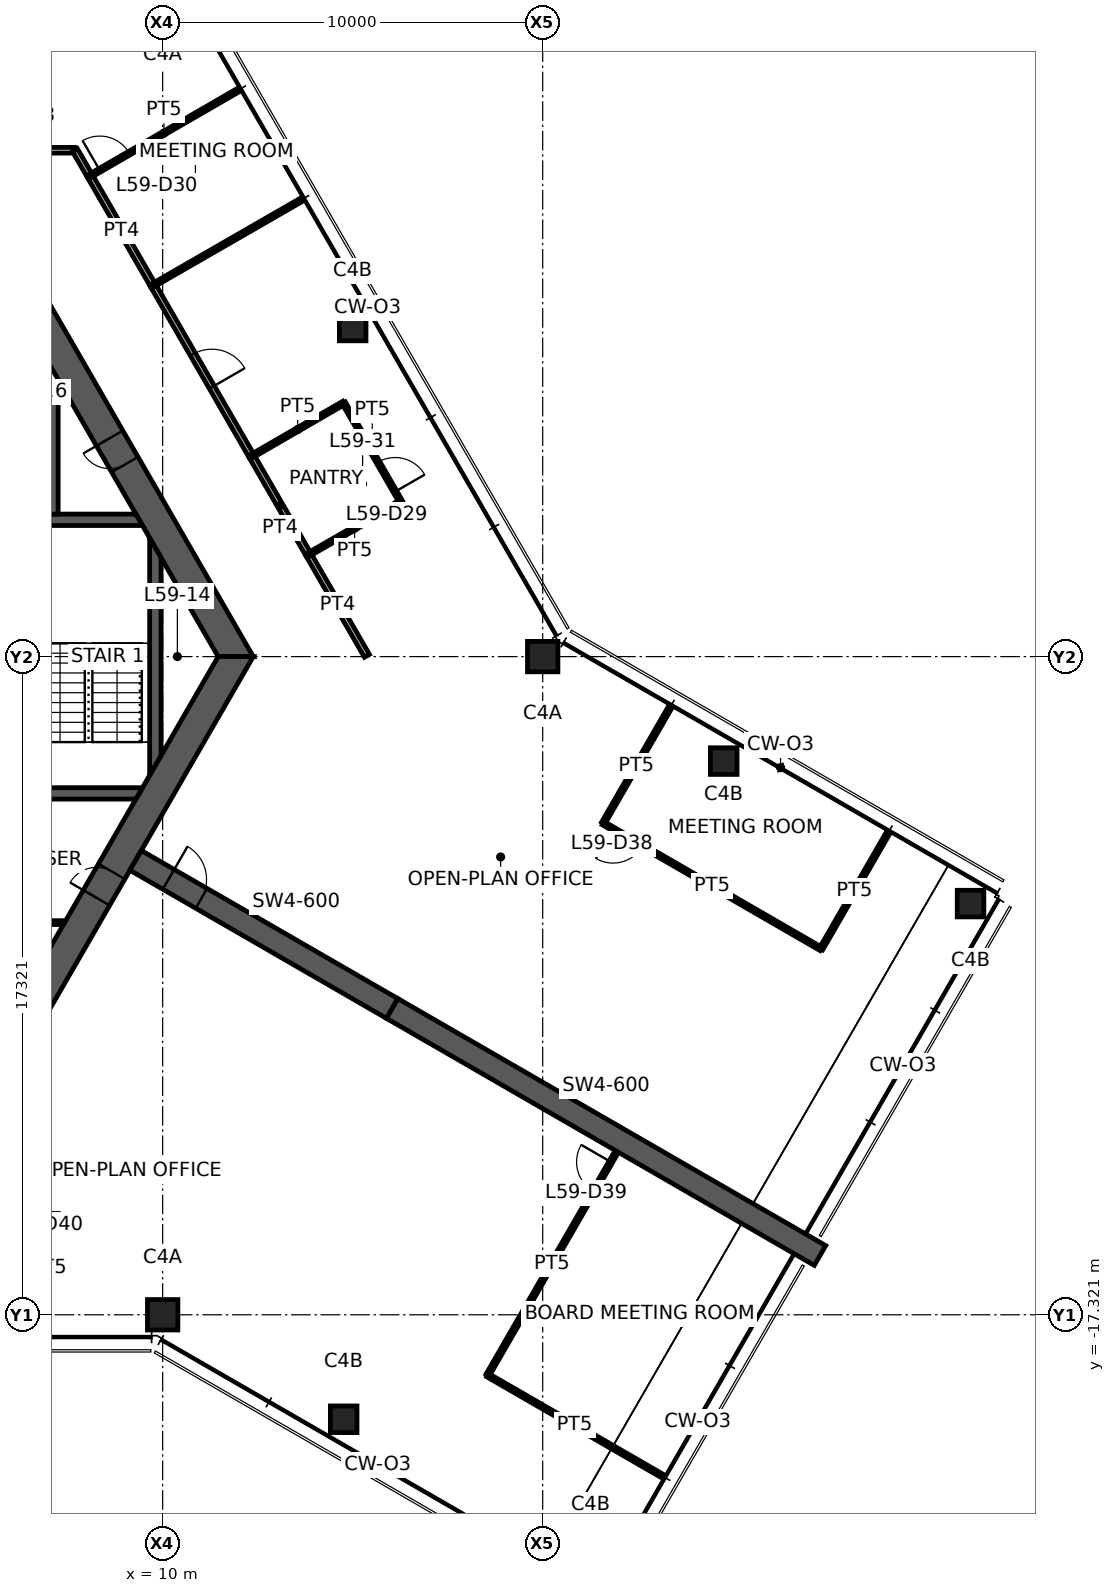
"""IFC4 building model, lengths in metres.
Left out: names, types, materials, properties, quantities, classifications, styles, units other than length and angle.
Written with IfcOpenShell. Run it as: python <this file> out.ifc"""

import sys

from ifc_helpers import new_model, si_unit, direction, frame, frame_2d, origin, origin_2d, place, context, subcontext, project, spatial, polyline, rectangle, hollow_rectangle, outline, extrude, element, fill, save


model = new_model("IFC4")
c1 = context("Model", 3, precision=1e-05, world=origin(), true_north=direction((0.0, 1.0)))
c2 = subcontext(c1, "Body", "Model", "MODEL_VIEW")
j1 = project(units=[si_unit("LENGTHUNIT", "METRE"), si_unit("PLANEANGLEUNIT", "RADIAN")], contexts=[c1])
p1 = place(None, origin())
s1 = spatial("IfcSite", under=j1, at=p1, CompositionType="ELEMENT")
p2 = place(p1, origin())
s2 = spatial("IfcBuilding", under=s1, at=p2, CompositionType="ELEMENT")
p3 = place(p2, frame((0.0, 0.0, 236.2)))
s3 = spatial("IfcBuildingStorey", under=s2, at=p3, CompositionType="ELEMENT", Elevation=236.2)
for number, where, z_axis, x_axis in (
    (1, (20.0, 0.0, 0.0), (0.0, 0.0, 1.0), (1.0, 0.0, 0.0)),
    (2, (10.0, -17.321, 0.0), (0.0, 0.0, 1.0), (1.0, 0.0, 0.0)),
):
    element("IfcColumn", number, at=place(p3, frame(where, z_axis=z_axis, x_axis=x_axis)), inside=s3, PredefinedType="COLUMN", context=c2, shape_type="SweptSolid", body=[
        extrude(hollow_rectangle(XDim=0.8, YDim=0.8, WallThickness=0.04, at=origin_2d()), origin(), (0.0, 0.0, 1.0), 3.9),
    ])
for number, where, z_axis, x_axis in (
    (3, (15.0, 8.66, 0.0), (0.0, 0.0, 1.0), (1.0, 0.0, 0.0)),
    (4, (14.763, -20.071, 0.0), (0.0, 0.0, 1.0), (1.0, 0.0, 0.0)),
    (5, (24.763, -2.75, 0.0), (0.0, 0.0, 1.0), (1.0, 0.0, 0.0)),
    (6, (31.258, -6.5, 0.0), (0.0, 0.0, 1.0), (1.0, 0.0, 0.0)),
):
    element("IfcColumn", number, at=place(p3, frame(where, z_axis=z_axis, x_axis=x_axis)), inside=s3, PredefinedType="COLUMN", context=c2, shape_type="SweptSolid", body=[
        extrude(hollow_rectangle(XDim=0.7, YDim=0.7, WallThickness=0.032, at=origin_2d()), origin(), (0.0, 0.0, 1.0), 3.9),
    ])
p4 = place(p3, frame((11.922, 0.0, 0.0), z_axis=(0.0, 0.0, 1.0), x_axis=(-0.500004296715, 0.866022923061, 0.0)))
e7 = element("IfcWall", 7, at=p4, inside=s3, PredefinedType="SHEAR", context=c2, shape_type="SweptSolid", body=[
    extrude(outline(polyline([(-0.231, -0.4), (5.835, -0.4), (6.635, -0.4), (12.153, -0.4), (11.691, 0.4), (6.635, 0.4), (5.835, 0.4), (0.231, 0.4), (-0.231, -0.4)])), origin(), (0.0, 0.0, 1.0), 3.9),
])
p5 = place(p4, frame((5.835, 0.0, 0.0)))
e8 = element("IfcOpeningElement", 8, at=p5, cuts=e7, PredefinedType="OPENING", context=c2, shape_type="SweptSolid", body=[
    extrude(rectangle(XDim=0.8, YDim=2.1, at=frame_2d((0.4, 1.05))), frame((0.0, 0.41, 0.0), z_axis=(0.0, -1.0, 0.0), x_axis=(1.0, 0.0, 0.0)), (0.0, 0.0, 1.0), 0.82),
])
p6 = place(p3, frame((5.961, -10.325, 0.0), z_axis=(0.0, 0.0, 1.0), x_axis=(0.500004296715, 0.866022923061, 0.0)))
e9 = element("IfcWall", 9, at=p6, inside=s3, PredefinedType="SHEAR", context=c2, shape_type="SweptSolid", body=[
    extrude(outline(polyline([(-0.231, -0.4), (4.594, -0.4), (5.394, -0.4), (12.153, -0.4), (11.691, 0.4), (5.394, 0.4), (4.594, 0.4), (0.231, 0.4), (-0.231, -0.4)])), origin(), (0.0, 0.0, 1.0), 3.9),
])
p7 = place(p6, frame((4.594, 0.0, 0.0)))
e10 = element("IfcOpeningElement", 10, at=p7, cuts=e9, PredefinedType="OPENING", context=c2, shape_type="SweptSolid", body=[
    extrude(rectangle(XDim=0.8, YDim=2.1, at=frame_2d((0.4, 1.05))), frame((0.0, 0.41, 0.0), z_axis=(0.0, -1.0, 0.0), x_axis=(1.0, 0.0, 0.0)), (0.0, 0.0, 1.0), 0.82),
])
p8 = place(p3, frame((9.288, -5.363, 0.0), z_axis=(0.0, 0.0, 1.0), x_axis=(0.866031736626, -0.499989031036, 0.0)))
e11 = element("IfcWall", 11, at=p8, inside=s3, PredefinedType="SHEAR", context=c2, shape_type="SweptSolid", body=[
    extrude(rectangle(XDim=7.796, YDim=0.6, at=frame_2d((3.898, 0.0))), origin(), (0.0, 0.0, 1.0), 3.9),
])
p9 = place(p8, frame((1.0, 0.0, 0.0)))
e12 = element("IfcOpeningElement", 12, at=p9, cuts=e11, PredefinedType="OPENING", context=c2, shape_type="SweptSolid", body=[
    extrude(rectangle(XDim=1.0, YDim=2.1, at=frame_2d((0.5, 1.05))), frame((0.0, 0.31, 0.0), z_axis=(0.0, -1.0, 0.0), x_axis=(1.0, 0.0, 0.0)), (0.0, 0.0, 1.0), 0.62),
])
p10 = place(p3, frame((16.039, -9.26, 0.0), z_axis=(0.0, 0.0, 1.0), x_axis=(0.866024837091, -0.50000098154, 0.0)))
e13 = element("IfcWall", 13, at=p10, inside=s3, PredefinedType="SHEAR", context=c2, shape_type="SweptSolid", body=[
    extrude(rectangle(XDim=13.0, YDim=0.6, at=frame_2d((6.5, 0.0))), origin(), (0.0, 0.0, 1.0), 3.9),
])
p11 = place(p3, frame((1.45, 3.6, 0.0), z_axis=(0.0, 0.0, 1.0), x_axis=(1.0, 0.0, 0.0)))
e14 = element("IfcWall", 14, at=p11, inside=s3, PredefinedType="SHEAR", context=c2, shape_type="SweptSolid", body=[
    extrude(outline(polyline([(0.0, -0.15), (1.15, -0.15), (2.05, -0.15), (3.4, -0.15), (4.7, -0.15), (8.019, -0.15), (7.845, 0.15), (4.7, 0.15), (3.4, 0.15), (2.05, 0.15), (1.15, 0.15), (0.0, 0.15), (0.0, -0.15)])), origin(), (0.0, 0.0, 1.0), 3.9),
])
p12 = place(p11, frame((1.15, 0.0, 0.0)))
e15 = element("IfcOpeningElement", 15, at=p12, cuts=e14, PredefinedType="OPENING", context=c2, shape_type="SweptSolid", body=[
    extrude(rectangle(XDim=0.9, YDim=2.1, at=frame_2d((0.45, 1.05))), frame((0.0, 0.16, 0.0), z_axis=(0.0, -1.0, 0.0), x_axis=(1.0, 0.0, 0.0)), (0.0, 0.0, 1.0), 0.32),
])
p13 = place(p11, frame((3.4, 0.0, 0.0)))
e16 = element("IfcOpeningElement", 16, at=p13, cuts=e14, PredefinedType="OPENING", context=c2, shape_type="SweptSolid", body=[
    extrude(rectangle(XDim=1.3, YDim=2.1, at=frame_2d((0.65, 1.05))), frame((0.0, 0.16, 0.0), z_axis=(0.0, -1.0, 0.0), x_axis=(1.0, 0.0, 0.0)), (0.0, 0.0, 1.0), 0.32),
])
p14 = place(p3, frame((1.45, -3.6, 0.0), z_axis=(0.0, 0.0, 1.0), x_axis=(1.0, 0.0, 0.0)))
e17 = element("IfcWall", 17, at=p14, inside=s3, PredefinedType="SHEAR", context=c2, shape_type="SweptSolid", body=[
    extrude(outline(polyline([(0.0, -0.15), (1.05, -0.15), (2.15, -0.15), (7.845, -0.15), (8.019, 0.15), (2.15, 0.15), (1.05, 0.15), (0.0, 0.15), (0.0, -0.15)])), origin(), (0.0, 0.0, 1.0), 3.9),
])
p15 = place(p14, frame((1.05, 0.0, 0.0)))
e18 = element("IfcOpeningElement", 18, at=p15, cuts=e17, PredefinedType="OPENING", context=c2, shape_type="SweptSolid", body=[
    extrude(rectangle(XDim=1.1, YDim=2.1, at=frame_2d((0.55, 1.05))), frame((0.0, 0.16, 0.0), z_axis=(0.0, -1.0, 0.0), x_axis=(1.0, 0.0, 0.0)), (0.0, 0.0, 1.0), 0.32),
])
p16 = place(p3, frame((4.65, 7.0, 0.0), z_axis=(0.0, 0.0, 1.0), x_axis=(1.0, 0.0, 0.0)))
e19 = element("IfcWall", 19, at=p16, inside=s3, PredefinedType="SHEAR", context=c2, shape_type="SweptSolid", body=[
    extrude(rectangle(XDim=2.6, YDim=0.3, at=frame_2d((1.3, 0.0))), origin(), (0.0, 0.0, 1.0), 3.9),
])
p17 = place(p3, frame((7.1, 3.75, 0.0), z_axis=(0.0, 0.0, 1.0), x_axis=(0.0, 1.0, 0.0)))
e20 = element("IfcWall", 20, at=p17, inside=s3, PredefinedType="SHEAR", context=c2, shape_type="SweptSolid", body=[
    extrude(rectangle(XDim=3.1, YDim=0.3, at=frame_2d((1.55, 0.0))), origin(), (0.0, 0.0, 1.0), 3.9),
])
p18 = place(p3, frame((9.808, -2.862, 0.0), z_axis=(0.0, 0.0, 1.0), x_axis=(0.0, 1.0, 0.0)))
e21 = element("IfcWall", 21, at=p18, inside=s3, PredefinedType="SHEAR", context=c2, shape_type="SweptSolid", body=[
    extrude(outline(polyline([(0.26, -0.15), (5.465, -0.15), (5.984, 0.15), (-0.26, 0.15), (0.26, -0.15)])), origin(), (0.0, 0.0, 1.0), 3.9),
])
p19 = place(p3, frame((4.65, -7.0, 0.0), z_axis=(0.0, 0.0, 1.0), x_axis=(1.0, 0.0, 0.0)))
e22 = element("IfcWall", 22, at=p19, inside=s3, PredefinedType="PARTITIONING", context=c2, shape_type="SweptSolid", body=[
    extrude(outline(polyline([(0.0, -0.05), (0.35, -0.05), (1.15, -0.05), (2.74, -0.05), (2.769, 0.0), (2.775, 0.05), (1.15, 0.05), (0.35, 0.05), (0.0, 0.05), (0.0, -0.05)])), origin(), (0.0, 0.0, 1.0), 2.95),
])
p20 = place(p19, frame((0.35, 0.0, 0.0)))
e23 = element("IfcOpeningElement", 23, at=p20, cuts=e22, PredefinedType="OPENING", context=c2, shape_type="SweptSolid", body=[
    extrude(rectangle(XDim=0.8, YDim=2.1, at=frame_2d((0.4, 1.05))), frame((0.0, 0.06, 0.0), z_axis=(0.0, -1.0, 0.0), x_axis=(1.0, 0.0, 0.0)), (0.0, 0.0, 1.0), 0.12),
])
p21 = place(p3, frame((12.337, 5.281, 0.0), z_axis=(0.0, 0.0, 1.0), x_axis=(0.499977562641, -0.866038357612, 0.0)))
e24 = element("IfcWall", 24, at=p21, inside=s3, PredefinedType="PARTITIONING", context=c2, shape_type="SweptSolid", body=[
    extrude(rectangle(XDim=3.01, YDim=0.15, at=frame_2d((1.505, 0.0))), origin(), (0.0, 0.0, 1.0), 2.95),
])
p22 = place(p3, frame((8.08, 12.656, 0.0), z_axis=(0.0, 0.0, 1.0), x_axis=(0.499990242038, -0.866031037473, 0.0)))
e25 = element("IfcWall", 25, at=p22, inside=s3, PredefinedType="PARTITIONING", context=c2, shape_type="SweptSolid", body=[
    extrude(rectangle(XDim=3.341, YDim=0.15, at=frame_2d((1.67, 0.0))), origin(), (0.0, 0.0, 1.0), 2.95),
])
p23 = place(p3, frame((9.745, 9.771, 0.0), z_axis=(0.0, 0.0, 1.0), x_axis=(0.499981525251, -0.866036069923, 0.0)))
e26 = element("IfcWall", 26, at=p23, inside=s3, PredefinedType="PARTITIONING", context=c2, shape_type="SweptSolid", body=[
    extrude(rectangle(XDim=5.194, YDim=0.15, at=frame_2d((2.597, 0.0))), origin(), (0.0, 0.0, 1.0), 2.95),
])
p24 = place(p23, frame((2.097, 0.0, 0.0)))
e27 = element("IfcOpeningElement", 27, at=p24, cuts=e26, PredefinedType="OPENING", context=c2, shape_type="SweptSolid", body=[
    extrude(rectangle(XDim=1.0, YDim=2.1, at=frame_2d((0.5, 1.05))), frame((0.0, 0.085, 0.0), z_axis=(0.0, -1.0, 0.0), x_axis=(1.0, 0.0, 0.0)), (0.0, 0.0, 1.0), 0.17),
])
p25 = place(p3, frame((13.838, 2.683, 0.0), z_axis=(0.0, 0.0, 1.0), x_axis=(0.499965335005, -0.866045416704, 0.0)))
e28 = element("IfcWall", 28, at=p25, inside=s3, PredefinedType="PARTITIONING", context=c2, shape_type="SweptSolid", body=[
    extrude(rectangle(XDim=3.074, YDim=0.15, at=frame_2d((1.537, 0.0))), origin(), (0.0, 0.0, 1.0), 2.95),
])
p26 = place(p3, frame((4.46, 13.325, 0.0), z_axis=(0.0, 0.0, 1.0), x_axis=(1.0, 0.0, 0.0)))
e29 = element("IfcWall", 29, at=p26, inside=s3, PredefinedType="PARTITIONING", context=c2, shape_type="SweptSolid", body=[
    extrude(rectangle(XDim=3.233, YDim=0.15, at=frame_2d((1.616, 0.0))), origin(), (0.0, 0.0, 1.0), 2.95),
])
p27 = place(p26, frame((1.116, 0.0, 0.0)))
e30 = element("IfcOpeningElement", 30, at=p27, cuts=e29, PredefinedType="OPENING", context=c2, shape_type="SweptSolid", body=[
    extrude(rectangle(XDim=1.0, YDim=2.1, at=frame_2d((0.5, 1.05))), frame((0.0, 0.085, 0.0), z_axis=(0.0, -1.0, 0.0), x_axis=(1.0, 0.0, 0.0)), (0.0, 0.0, 1.0), 0.17),
])
p28 = place(p3, frame((7.693, 13.325, 0.0), z_axis=(0.0, 0.0, 1.0), x_axis=(0.50010075504, -0.86596722502, 0.0)))
e31 = element("IfcWall", 31, at=p28, inside=s3, PredefinedType="PARTITIONING", context=c2, shape_type="SweptSolid", body=[
    extrude(rectangle(XDim=0.782, YDim=0.15, at=frame_2d((0.391, 0.0))), origin(), (0.0, 0.0, 1.0), 2.95),
])
p29 = place(p3, frame((12.342, 5.273, 0.0), z_axis=(0.0, 0.0, 1.0), x_axis=(0.865195372903, 0.501434907746, 0.0)))
e32 = element("IfcWall", 32, at=p29, inside=s3, PredefinedType="PARTITIONING", context=c2, shape_type="SweptSolid", body=[
    extrude(rectangle(XDim=2.8, YDim=0.1, at=frame_2d((1.4, 0.0))), origin(), (0.0, 0.0, 1.0), 2.95),
])
p30 = place(p3, frame((14.765, 6.677, 0.0), z_axis=(0.0, 0.0, 1.0), x_axis=(0.499990139034, -0.866031096941, 0.0)))
e33 = element("IfcWall", 33, at=p30, inside=s3, PredefinedType="PARTITIONING", context=c2, shape_type="SweptSolid", body=[
    extrude(rectangle(XDim=3.0, YDim=0.1, at=frame_2d((1.5, 0.0))), origin(), (0.0, 0.0, 1.0), 2.95),
])
p31 = place(p30, frame((1.8, 0.0, 0.0)))
e34 = element("IfcOpeningElement", 34, at=p31, cuts=e33, PredefinedType="OPENING", context=c2, shape_type="SweptSolid", body=[
    extrude(rectangle(XDim=0.9, YDim=2.1, at=frame_2d((0.45, 1.05))), frame((0.0, 0.06, 0.0), z_axis=(0.0, -1.0, 0.0), x_axis=(1.0, 0.0, 0.0)), (0.0, 0.0, 1.0), 0.12),
])
p32 = place(p3, frame((16.265, 4.079, 0.0), z_axis=(0.0, 0.0, 1.0), x_axis=(-0.86679607088, -0.498662783358, 0.0)))
e35 = element("IfcWall", 35, at=p32, inside=s3, PredefinedType="PARTITIONING", context=c2, shape_type="SweptSolid", body=[
    extrude(rectangle(XDim=2.8, YDim=0.1, at=frame_2d((1.4, 0.0))), origin(), (0.0, 0.0, 1.0), 2.95),
])
p33 = place(p3, frame((13.623, 12.004, 0.0), z_axis=(0.0, 0.0, 1.0), x_axis=(-0.866535947524, -0.499114667835, 0.0)))
e36 = element("IfcWall", 36, at=p33, inside=s3, PredefinedType="PARTITIONING", context=c2, shape_type="SweptSolid", body=[
    extrude(rectangle(XDim=4.475, YDim=0.1, at=frame_2d((2.238, 0.0))), origin(), (0.0, 0.0, 1.0), 2.95),
])
p34 = place(p3, frame((8.084, 12.648, 0.0), z_axis=(0.0, 0.0, 1.0), x_axis=(0.865532616855, 0.500852562298, 0.0)))
e37 = element("IfcWall", 37, at=p34, inside=s3, PredefinedType="PARTITIONING", context=c2, shape_type="SweptSolid", body=[
    extrude(rectangle(XDim=4.506, YDim=0.1, at=frame_2d((2.253, 0.0))), origin(), (0.0, 0.0, 1.0), 2.95),
])
p35 = place(p34, frame((0.3, 0.0, 0.0)))
e38 = element("IfcOpeningElement", 38, at=p35, cuts=e37, PredefinedType="OPENING", context=c2, shape_type="SweptSolid", body=[
    extrude(rectangle(XDim=0.9, YDim=2.1, at=frame_2d((0.45, 1.05))), frame((0.0, 0.06, 0.0), z_axis=(0.0, -1.0, 0.0), x_axis=(1.0, 0.0, 0.0)), (0.0, 0.0, 1.0), 0.12),
])
p36 = place(p3, frame((21.592, -4.383, 0.0), z_axis=(0.0, 0.0, 1.0), x_axis=(0.500009906705, 0.86601968407, 0.0)))
e39 = element("IfcWall", 39, at=p36, inside=s3, PredefinedType="PARTITIONING", context=c2, shape_type="SweptSolid", body=[
    extrude(rectangle(XDim=3.48, YDim=0.1, at=frame_2d((1.74, 0.0))), origin(), (0.0, 0.0, 1.0), 2.95),
])
p37 = place(p3, frame((27.325, -7.693, 0.0), z_axis=(0.0, 0.0, 1.0), x_axis=(-0.866021597574, 0.500006592492, 0.0)))
e40 = element("IfcWall", 40, at=p37, inside=s3, PredefinedType="PARTITIONING", context=c2, shape_type="SweptSolid", body=[
    extrude(rectangle(XDim=6.62, YDim=0.1, at=frame_2d((3.31, 0.0))), origin(), (0.0, 0.0, 1.0), 2.95),
])
p38 = place(p37, frame((5.42, 0.0, 0.0)))
e41 = element("IfcOpeningElement", 41, at=p38, cuts=e40, PredefinedType="OPENING", context=c2, shape_type="SweptSolid", body=[
    extrude(rectangle(XDim=0.9, YDim=2.1, at=frame_2d((0.45, 1.05))), frame((0.0, 0.06, 0.0), z_axis=(0.0, -1.0, 0.0), x_axis=(1.0, 0.0, 0.0)), (0.0, 0.0, 1.0), 0.12),
])
p39 = place(p3, frame((29.08, -4.653, 0.0), z_axis=(0.0, 0.0, 1.0), x_axis=(-0.500021481416, -0.866013001128, 0.0)))
e42 = element("IfcWall", 42, at=p39, inside=s3, PredefinedType="PARTITIONING", context=c2, shape_type="SweptSolid", body=[
    extrude(rectangle(XDim=3.51, YDim=0.1, at=frame_2d((1.755, 0.0))), origin(), (0.0, 0.0, 1.0), 2.95),
])
p40 = place(p3, frame((18.552, -18.909, 0.0), z_axis=(0.0, 0.0, 1.0), x_axis=(0.499992600721, 0.866029675718, 0.0)))
e43 = element("IfcWall", 43, at=p40, inside=s3, PredefinedType="PARTITIONING", context=c2, shape_type="SweptSolid", body=[
    extrude(rectangle(XDim=6.78, YDim=0.1, at=frame_2d((3.39, 0.0))), origin(), (0.0, 0.0, 1.0), 2.95),
])
p41 = place(p40, frame((5.58, 0.0, 0.0)))
e44 = element("IfcOpeningElement", 44, at=p41, cuts=e43, PredefinedType="OPENING", context=c2, shape_type="SweptSolid", body=[
    extrude(rectangle(XDim=0.9, YDim=2.1, at=frame_2d((0.45, 1.05))), frame((0.0, 0.06, 0.0), z_axis=(0.0, -1.0, 0.0), x_axis=(1.0, 0.0, 0.0)), (0.0, 0.0, 1.0), 0.12),
])
p42 = place(p3, frame((23.124, -21.549, 0.0), z_axis=(0.0, 0.0, 1.0), x_axis=(-0.866009249374, 0.500027979216, 0.0)))
e45 = element("IfcWall", 45, at=p42, inside=s3, PredefinedType="PARTITIONING", context=c2, shape_type="SweptSolid", body=[
    extrude(rectangle(XDim=5.28, YDim=0.1, at=frame_2d((2.64, 0.0))), origin(), (0.0, 0.0, 1.0), 2.95),
])
p43 = place(p5, origin())
e46 = element("IfcDoor", 46, at=p43, inside=s3, OperationType="SINGLE_SWING_RIGHT", PredefinedType="DOOR", context=c2, shape_type="SweptSolid", body=[
    extrude(rectangle(XDim=0.8, YDim=2.1, at=frame_2d((0.4, 1.05))), frame((0.0, 0.025, 0.0), z_axis=(0.0, -1.0, 0.0), x_axis=(1.0, 0.0, 0.0)), (0.0, 0.0, 1.0), 0.05),
])
fill(e8, e46)
p44 = place(p7, origin())
e47 = element("IfcDoor", 47, at=p44, inside=s3, OperationType="SINGLE_SWING_LEFT", PredefinedType="DOOR", context=c2, shape_type="SweptSolid", body=[
    extrude(rectangle(XDim=0.8, YDim=2.1, at=frame_2d((0.4, 1.05))), frame((0.0, 0.025, 0.0), z_axis=(0.0, -1.0, 0.0), x_axis=(1.0, 0.0, 0.0)), (0.0, 0.0, 1.0), 0.05),
])
fill(e10, e47)
p45 = place(p9, origin())
e48 = element("IfcDoor", 48, at=p45, inside=s3, OperationType="SINGLE_SWING_LEFT", PredefinedType="DOOR", context=c2, shape_type="SweptSolid", body=[
    extrude(rectangle(XDim=1.0, YDim=2.1, at=frame_2d((0.5, 1.05))), frame((0.0, 0.025, 0.0), z_axis=(0.0, -1.0, 0.0), x_axis=(1.0, 0.0, 0.0)), (0.0, 0.0, 1.0), 0.05),
])
fill(e12, e48)
p46 = place(p24, origin())
e49 = element("IfcDoor", 49, at=p46, inside=s3, OperationType="SINGLE_SWING_RIGHT", PredefinedType="DOOR", context=c2, shape_type="SweptSolid", body=[
    extrude(rectangle(XDim=1.0, YDim=2.1, at=frame_2d((0.5, 1.05))), frame((0.0, 0.025, 0.0), z_axis=(0.0, -1.0, 0.0), x_axis=(1.0, 0.0, 0.0)), (0.0, 0.0, 1.0), 0.05),
])
fill(e27, e49)
p47 = place(p31, origin())
e50 = element("IfcDoor", 50, at=p47, inside=s3, OperationType="SINGLE_SWING_RIGHT", PredefinedType="DOOR", context=c2, shape_type="SweptSolid", body=[
    extrude(rectangle(XDim=0.9, YDim=2.1, at=frame_2d((0.45, 1.05))), frame((0.0, 0.025, 0.0), z_axis=(0.0, -1.0, 0.0), x_axis=(1.0, 0.0, 0.0)), (0.0, 0.0, 1.0), 0.05),
])
fill(e34, e50)
p48 = place(p35, origin())
e51 = element("IfcDoor", 51, at=p48, inside=s3, OperationType="SINGLE_SWING_LEFT", PredefinedType="DOOR", context=c2, shape_type="SweptSolid", body=[
    extrude(rectangle(XDim=0.9, YDim=2.1, at=frame_2d((0.45, 1.05))), frame((0.0, 0.025, 0.0), z_axis=(0.0, -1.0, 0.0), x_axis=(1.0, 0.0, 0.0)), (0.0, 0.0, 1.0), 0.05),
])
fill(e38, e51)
p49 = place(p38, origin())
e52 = element("IfcDoor", 52, at=p49, inside=s3, OperationType="SINGLE_SWING_RIGHT", PredefinedType="DOOR", context=c2, shape_type="SweptSolid", body=[
    extrude(rectangle(XDim=0.9, YDim=2.1, at=frame_2d((0.45, 1.05))), frame((0.0, 0.025, 0.0), z_axis=(0.0, -1.0, 0.0), x_axis=(1.0, 0.0, 0.0)), (0.0, 0.0, 1.0), 0.05),
])
fill(e41, e52)
p50 = place(p41, origin())
e53 = element("IfcDoor", 53, at=p50, inside=s3, OperationType="SINGLE_SWING_RIGHT", PredefinedType="DOOR", context=c2, shape_type="SweptSolid", body=[
    extrude(rectangle(XDim=0.9, YDim=2.1, at=frame_2d((0.45, 1.05))), frame((0.0, 0.025, 0.0), z_axis=(0.0, -1.0, 0.0), x_axis=(1.0, 0.0, 0.0)), (0.0, 0.0, 1.0), 0.05),
])
fill(e44, e53)
save(model, sys.argv[1])
